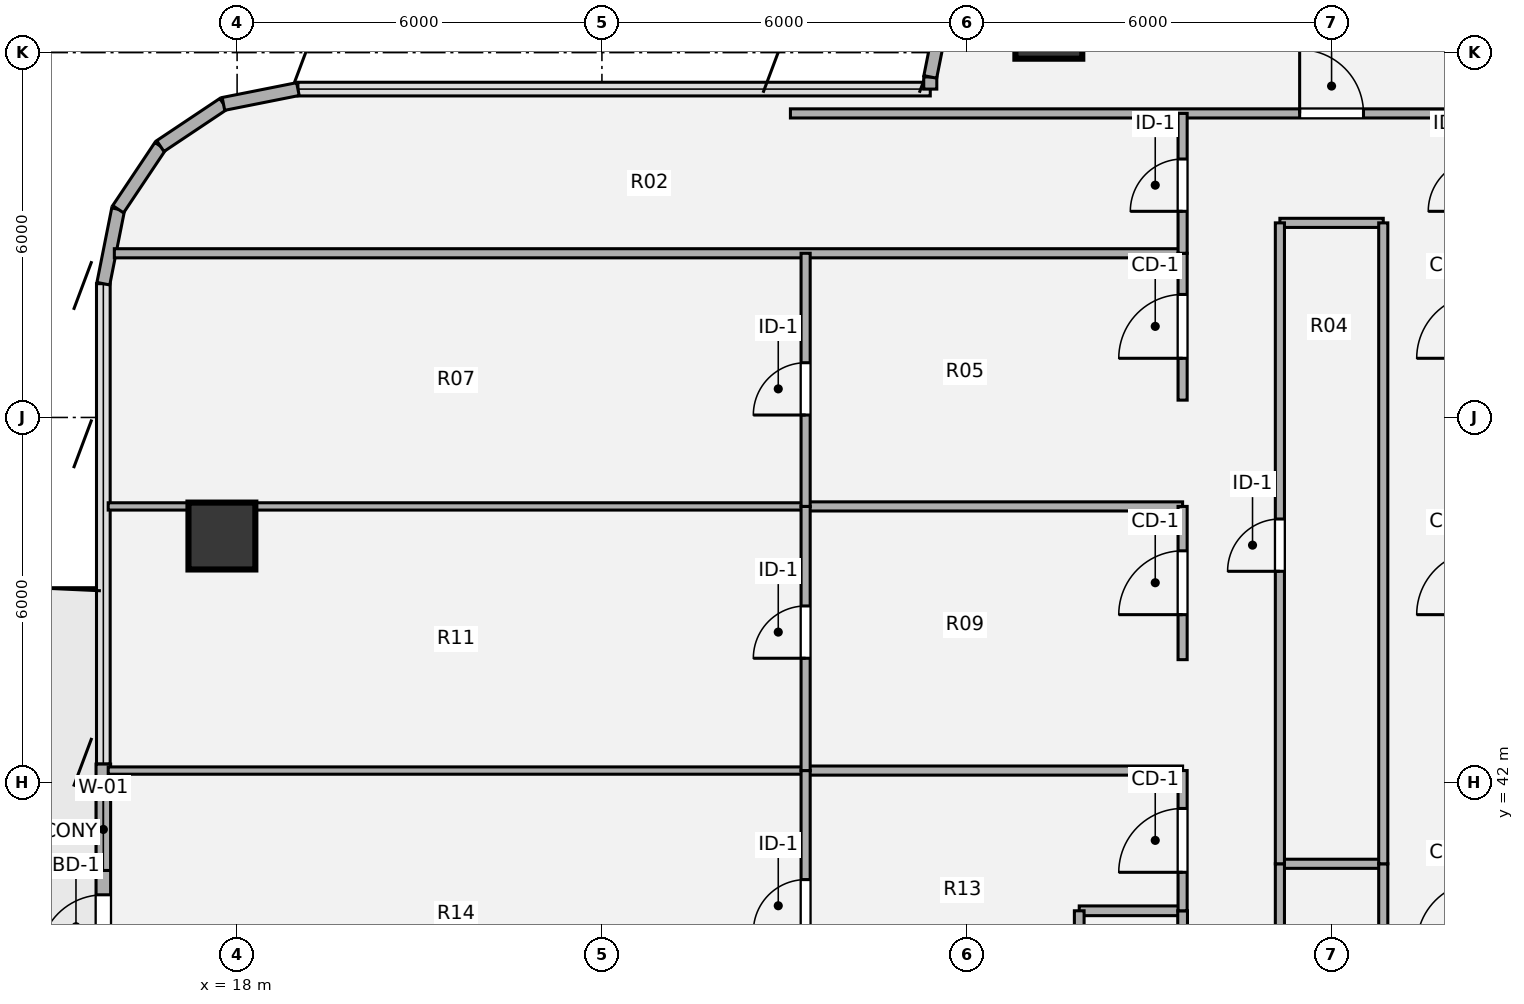
"""IFC4 building model, lengths in metres.
Left out: names, types, materials, properties, quantities, classifications, styles, units other than length and angle.
Written with IfcOpenShell. Run it as: python <this file> out.ifc"""

import sys

from ifc_helpers import new_model, si_unit, direction, frame, frame_2d, origin, origin_2d, place, context, subcontext, project, spatial, rectangle, hollow_circle, extrude, source, transform, mapped, element, fill, save


model = new_model("IFC4")
c1 = context("Model", 3, precision=1e-05, world=origin(), true_north=direction((0.0, 1.0)))
c2 = subcontext(c1, "Body", "Model", "MODEL_VIEW")
j1 = project(units=[si_unit("LENGTHUNIT", "METRE"), si_unit("PLANEANGLEUNIT", "RADIAN")], contexts=[c1])
p1 = place(None, origin())
s1 = spatial("IfcSite", under=j1, at=p1, CompositionType="ELEMENT")
p2 = place(p1, origin())
s2 = spatial("IfcBuilding", under=s1, at=p2, CompositionType="ELEMENT")
p3 = place(p2, frame((0.0, 0.0, 201.78)))
s3 = spatial("IfcBuildingStorey", under=s2, at=p3, CompositionType="ELEMENT", Elevation=201.78)
m1 = source(origin(), c2, "Body", "SweptSolid", [
    extrude(hollow_circle(Radius=0.55, WallThickness=0.04, at=origin_2d()), origin(), (0.0, 0.0, 1.0), 3.78),
])
for number, where, z_axis, x_axis in (
    (1, (17.75, 46.05, 0.0), (0.0, 0.0, 1.0), (1.0, 0.0, 0.0)),
    (2, (31.35, 54.45, 0.0), (0.0, 0.0, 1.0), (1.0, 0.0, 0.0)),
):
    element("IfcColumn", number, at=place(p3, frame(where, z_axis=z_axis, x_axis=x_axis)), inside=s3, PredefinedType="COLUMN", context=c2, shape_type="MappedRepresentation", body=[
        mapped(m1, transform((0.0, 0.0, 0.0), x_axis=(1.0, 0.0, 0.0), y_axis=(0.0, 1.0, 0.0), z_axis=(0.0, 0.0, 1.0), scale=1.0)),
    ])
p4 = place(p3, frame((15.8, 38.7, 0.0), z_axis=(0.0, 0.0, 1.0), x_axis=(0.0, 1.0, 0.0)))
e3 = element("IfcWall", 3, at=p4, inside=s3, PredefinedType="SOLIDWALL", context=c2, shape_type="SweptSolid", body=[
    extrude(rectangle(XDim=3.6, YDim=0.24, at=frame_2d((1.8, 0.0))), origin(), (0.0, 0.0, 1.0), 3.53),
])
p5 = place(p4, frame((0.4, 0.0, 0.0)))
e4 = element("IfcOpeningElement", 4, at=p5, cuts=e3, PredefinedType="OPENING", context=c2, shape_type="SweptSolid", body=[
    extrude(rectangle(XDim=1.05, YDim=2.15, at=origin_2d()), frame((0.525, 0.13, 1.075), z_axis=(0.0, -1.0, 0.0), x_axis=(1.0, 0.0, 0.0)), (0.0, 0.0, 1.0), 0.26),
])
p6 = place(p4, frame((1.85, 0.0, 0.85)))
e5 = element("IfcOpeningElement", 5, at=p6, cuts=e3, PredefinedType="OPENING", context=c2, shape_type="SweptSolid", body=[
    extrude(rectangle(XDim=1.35, YDim=1.35, at=origin_2d()), frame((0.675, 0.13, 0.675), z_axis=(0.0, -1.0, 0.0), x_axis=(1.0, 0.0, 0.0)), (0.0, 0.0, 1.0), 0.26),
])
for number, where, z_axis, x_axis in (
    (6, (15.8, 50.2, 0.0), (0.0, 0.0, 1.0), (0.195, 0.981, 0.0)),
    (7, (16.044, 51.425, 0.0), (0.0, 0.0, 1.0), (0.556, 0.831, 0.0)),
    (8, (16.737, 52.463, 0.0), (0.0, 0.0, 1.0), (0.831, 0.556, 0.0)),
    (9, (17.775, 53.156, 0.0), (0.0, 0.0, 1.0), (0.981, 0.195, 0.0)),
):
    element("IfcWall", number, at=place(p3, frame(where, z_axis=z_axis, x_axis=x_axis)), inside=s3, PredefinedType="SOLIDWALL", context=c2, shape_type="SweptSolid", body=[
        extrude(rectangle(XDim=1.249, YDim=0.215, at=frame_2d((0.624, 0.0))), origin(), (0.0, 0.0, 1.0), 3.53),
    ])
p7 = place(p3, frame((29.4, 53.4, 0.0), z_axis=(0.0, 0.0, 1.0), x_axis=(0.0, 1.0, 0.0)))
e10 = element("IfcWall", 10, at=p7, inside=s3, PredefinedType="SOLIDWALL", context=c2, shape_type="SweptSolid", body=[
    extrude(rectangle(XDim=0.2, YDim=0.215, at=frame_2d((0.1, 0.0))), origin(), (0.0, 0.0, 1.0), 3.53),
])
p8 = place(p3, frame((29.4, 53.6, 0.0), z_axis=(0.0, 0.0, 1.0), x_axis=(0.195127417394, 0.980777900945, 0.0)))
e11 = element("IfcWall", 11, at=p8, inside=s3, PredefinedType="SOLIDWALL", context=c2, shape_type="SweptSolid", body=[
    extrude(rectangle(XDim=1.092, YDim=0.215, at=frame_2d((0.546, 0.0))), origin(), (0.0, 0.0, 1.0), 3.53),
])
p9 = place(p3, frame((31.85, 39.887, 0.0), z_axis=(0.0, 0.0, 1.0), x_axis=(1.0, 0.0, 0.0)))
e12 = element("IfcWall", 12, at=p9, inside=s3, PredefinedType="PLUMBINGWALL", context=c2, shape_type="SweptSolid", body=[
    extrude(rectangle(XDim=1.7, YDim=0.16, at=frame_2d((0.85, 0.0))), origin(), (0.0, 0.0, 1.0), 3.259),
])
p10 = place(p3, frame((35.15, 40.66, 0.0), z_axis=(0.0, 0.0, 1.0), x_axis=(1.0, 0.0, 0.0)))
e13 = element("IfcWall", 13, at=p10, inside=s3, PredefinedType="PARTITIONING", context=c2, shape_type="SweptSolid", body=[
    extrude(rectangle(XDim=1.7, YDim=0.15, at=frame_2d((0.85, 0.0))), origin(), (0.0, 0.0, 1.0), 3.259),
])
p11 = place(p3, frame((15.88, 42.193, 0.0), z_axis=(0.0, 0.0, 1.0), x_axis=(1.0, 0.0, 0.0)))
e14 = element("IfcWall", 14, at=p11, inside=s3, PredefinedType="PARTITIONING", context=c2, shape_type="SweptSolid", body=[
    extrude(rectangle(XDim=11.47, YDim=0.12, at=frame_2d((5.735, 0.0))), origin(), (0.0, 0.0, 1.0), 2.982),
])
p12 = place(p3, frame((27.35, 42.193, 0.0), z_axis=(0.0, 0.0, 1.0), x_axis=(1.0, 0.0, 0.0)))
e15 = element("IfcWall", 15, at=p12, inside=s3, PredefinedType="PARTITIONING", context=c2, shape_type="SweptSolid", body=[
    extrude(rectangle(XDim=6.2, YDim=0.15, at=frame_2d((3.1, 0.0))), origin(), (0.0, 0.0, 1.0), 2.982),
])
p13 = place(p3, frame((15.88, 46.537, 0.0), z_axis=(0.0, 0.0, 1.0), x_axis=(1.0, 0.0, 0.0)))
e16 = element("IfcWall", 16, at=p13, inside=s3, PredefinedType="PARTITIONING", context=c2, shape_type="SweptSolid", body=[
    extrude(rectangle(XDim=11.47, YDim=0.12, at=frame_2d((5.735, 0.0))), origin(), (0.0, 0.0, 1.0), 3.5),
])
p14 = place(p3, frame((27.35, 46.537, 0.0), z_axis=(0.0, 0.0, 1.0), x_axis=(1.0, 0.0, 0.0)))
e17 = element("IfcWall", 17, at=p14, inside=s3, PredefinedType="PARTITIONING", context=c2, shape_type="SweptSolid", body=[
    extrude(rectangle(XDim=6.2, YDim=0.15, at=frame_2d((3.1, 0.0))), origin(), (0.0, 0.0, 1.0), 3.259),
])
p15 = place(p3, frame((15.981, 50.7, 0.0), z_axis=(0.0, 0.0, 1.0), x_axis=(1.0, 0.0, 0.0)))
e18 = element("IfcWall", 18, at=p15, inside=s3, PredefinedType="PARTITIONING", context=c2, shape_type="SweptSolid", body=[
    extrude(rectangle(XDim=17.569, YDim=0.15, at=frame_2d((8.785, 0.0))), origin(), (0.0, 0.0, 1.0), 3.308),
])
p16 = place(p3, frame((35.15, 51.2, 0.0), z_axis=(0.0, 0.0, 1.0), x_axis=(1.0, 0.0, 0.0)))
e19 = element("IfcWall", 19, at=p16, inside=s3, PredefinedType="PARTITIONING", context=c2, shape_type="SweptSolid", body=[
    extrude(rectangle(XDim=1.7, YDim=0.15, at=frame_2d((0.85, 0.0))), origin(), (0.0, 0.0, 1.0), 3.308),
])
p17 = place(p3, frame((27.1, 53.0, 0.0), z_axis=(0.0, 0.0, 1.0), x_axis=(1.0, 0.0, 0.0)))
e20 = element("IfcWall", 20, at=p17, inside=s3, PredefinedType="PARTITIONING", context=c2, shape_type="SweptSolid", body=[
    extrude(rectangle(XDim=17.8, YDim=0.15, at=frame_2d((8.9, 0.0))), origin(), (0.0, 0.0, 1.0), 3.308),
])
p18 = place(p17, frame((8.375, 0.0, 0.0)))
e21 = element("IfcOpeningElement", 21, at=p18, cuts=e20, PredefinedType="OPENING", context=c2, shape_type="SweptSolid", body=[
    extrude(rectangle(XDim=1.05, YDim=2.1, at=origin_2d()), frame((0.525, 0.085, 1.05), z_axis=(0.0, -1.0, 0.0), x_axis=(1.0, 0.0, 0.0)), (0.0, 0.0, 1.0), 0.17),
])
p19 = place(p3, frame((27.35, 37.487, 0.0), z_axis=(0.0, 0.0, 1.0), x_axis=(0.0, 1.0, 0.0)))
e22 = element("IfcWall", 22, at=p19, inside=s3, PredefinedType="PARTITIONING", context=c2, shape_type="SweptSolid", body=[
    extrude(rectangle(XDim=4.706, YDim=0.15, at=frame_2d((2.353, 0.0))), origin(), (0.0, 0.0, 1.0), 3.5),
])
p20 = place(p19, frame((2.053, 0.0, 0.0)))
e23 = element("IfcOpeningElement", 23, at=p20, cuts=e22, PredefinedType="OPENING", context=c2, shape_type="SweptSolid", body=[
    extrude(rectangle(XDim=0.86, YDim=2.1, at=origin_2d()), frame((0.43, 0.085, 1.05), z_axis=(0.0, -1.0, 0.0), x_axis=(1.0, 0.0, 0.0)), (0.0, 0.0, 1.0), 0.17),
])
p21 = place(p3, frame((27.35, 42.193, 0.0), z_axis=(0.0, 0.0, 1.0), x_axis=(0.0, 1.0, 0.0)))
e24 = element("IfcWall", 24, at=p21, inside=s3, PredefinedType="PARTITIONING", context=c2, shape_type="SweptSolid", body=[
    extrude(rectangle(XDim=4.344, YDim=0.15, at=frame_2d((2.172, 0.0))), origin(), (0.0, 0.0, 1.0), 3.5),
])
p22 = place(p21, frame((1.847, 0.0, 0.0)))
e25 = element("IfcOpeningElement", 25, at=p22, cuts=e24, PredefinedType="OPENING", context=c2, shape_type="SweptSolid", body=[
    extrude(rectangle(XDim=0.86, YDim=2.1, at=origin_2d()), frame((0.43, 0.085, 1.05), z_axis=(0.0, -1.0, 0.0), x_axis=(1.0, 0.0, 0.0)), (0.0, 0.0, 1.0), 0.17),
])
p23 = place(p3, frame((27.35, 46.537, 0.0), z_axis=(0.0, 0.0, 1.0), x_axis=(0.0, 1.0, 0.0)))
e26 = element("IfcWall", 26, at=p23, inside=s3, PredefinedType="PARTITIONING", context=c2, shape_type="SweptSolid", body=[
    extrude(rectangle(XDim=4.163, YDim=0.15, at=frame_2d((2.082, 0.0))), origin(), (0.0, 0.0, 1.0), 3.5),
])
p24 = place(p23, frame((1.503, 0.0, 0.0)))
e27 = element("IfcOpeningElement", 27, at=p24, cuts=e26, PredefinedType="OPENING", context=c2, shape_type="SweptSolid", body=[
    extrude(rectangle(XDim=0.86, YDim=2.1, at=origin_2d()), frame((0.43, 0.085, 1.05), z_axis=(0.0, -1.0, 0.0), x_axis=(1.0, 0.0, 0.0)), (0.0, 0.0, 1.0), 0.17),
])
p25 = place(p3, frame((31.85, 37.487, 0.0), z_axis=(0.0, 0.0, 1.0), x_axis=(0.0, 1.0, 0.0)))
e28 = element("IfcWall", 28, at=p25, inside=s3, PredefinedType="PLUMBINGWALL", context=c2, shape_type="SweptSolid", body=[
    extrude(rectangle(XDim=2.4, YDim=0.16, at=frame_2d((1.2, 0.0))), origin(), (0.0, 0.0, 1.0), 3.5),
])
p26 = place(p25, frame((0.42, 0.0, 0.0)))
e29 = element("IfcOpeningElement", 29, at=p26, cuts=e28, PredefinedType="OPENING", context=c2, shape_type="SweptSolid", body=[
    extrude(rectangle(XDim=0.86, YDim=2.1, at=origin_2d()), frame((0.43, 0.09, 1.05), z_axis=(0.0, -1.0, 0.0), x_axis=(1.0, 0.0, 0.0)), (0.0, 0.0, 1.0), 0.18),
])
p27 = place(p3, frame((33.55, 37.487, 0.0), z_axis=(0.0, 0.0, 1.0), x_axis=(0.0, 1.0, 0.0)))
e30 = element("IfcWall", 30, at=p27, inside=s3, PredefinedType="PLUMBINGWALL", context=c2, shape_type="SweptSolid", body=[
    extrude(rectangle(XDim=2.4, YDim=0.16, at=frame_2d((1.2, 0.0))), origin(), (0.0, 0.0, 1.0), 3.5),
])
p28 = place(p3, frame((33.55, 39.887, 0.0), z_axis=(0.0, 0.0, 1.0), x_axis=(0.0, 1.0, 0.0)))
e31 = element("IfcWall", 31, at=p28, inside=s3, PredefinedType="PARTITIONING", context=c2, shape_type="SweptSolid", body=[
    extrude(rectangle(XDim=2.306, YDim=0.15, at=frame_2d((1.153, 0.0))), origin(), (0.0, 0.0, 1.0), 3.5),
])
p29 = place(p28, frame((0.633, 0.0, 0.0)))
e32 = element("IfcOpeningElement", 32, at=p29, cuts=e31, PredefinedType="OPENING", context=c2, shape_type="SweptSolid", body=[
    extrude(rectangle(XDim=1.05, YDim=2.1, at=origin_2d()), frame((0.525, 0.085, 1.05), z_axis=(0.0, -1.0, 0.0), x_axis=(1.0, 0.0, 0.0)), (0.0, 0.0, 1.0), 0.17),
])
p30 = place(p3, frame((33.55, 44.017, 0.0), z_axis=(0.0, 0.0, 1.0), x_axis=(0.0, 1.0, 0.0)))
e33 = element("IfcWall", 33, at=p30, inside=s3, PredefinedType="PARTITIONING", context=c2, shape_type="SweptSolid", body=[
    extrude(rectangle(XDim=2.52, YDim=0.15, at=frame_2d((1.26, 0.0))), origin(), (0.0, 0.0, 1.0), 3.5),
])
p31 = place(p30, frame((0.74, 0.0, 0.0)))
e34 = element("IfcOpeningElement", 34, at=p31, cuts=e33, PredefinedType="OPENING", context=c2, shape_type="SweptSolid", body=[
    extrude(rectangle(XDim=1.05, YDim=2.1, at=origin_2d()), frame((0.525, 0.085, 1.05), z_axis=(0.0, -1.0, 0.0), x_axis=(1.0, 0.0, 0.0)), (0.0, 0.0, 1.0), 0.17),
])
p32 = place(p3, frame((33.55, 48.285, 0.0), z_axis=(0.0, 0.0, 1.0), x_axis=(0.0, 1.0, 0.0)))
e35 = element("IfcWall", 35, at=p32, inside=s3, PredefinedType="PARTITIONING", context=c2, shape_type="SweptSolid", body=[
    extrude(rectangle(XDim=2.415, YDim=0.15, at=frame_2d((1.208, 0.0))), origin(), (0.0, 0.0, 1.0), 3.5),
])
p33 = place(p32, frame((0.688, 0.0, 0.0)))
e36 = element("IfcOpeningElement", 36, at=p33, cuts=e35, PredefinedType="OPENING", context=c2, shape_type="SweptSolid", body=[
    extrude(rectangle(XDim=1.05, YDim=2.1, at=origin_2d()), frame((0.525, 0.085, 1.05), z_axis=(0.0, -1.0, 0.0), x_axis=(1.0, 0.0, 0.0)), (0.0, 0.0, 1.0), 0.17),
])
p34 = place(p3, frame((33.55, 50.7, 0.0), z_axis=(0.0, 0.0, 1.0), x_axis=(0.0, 1.0, 0.0)))
e37 = element("IfcWall", 37, at=p34, inside=s3, PredefinedType="PARTITIONING", context=c2, shape_type="SweptSolid", body=[
    extrude(rectangle(XDim=2.3, YDim=0.15, at=frame_2d((1.15, 0.0))), origin(), (0.0, 0.0, 1.0), 3.5),
])
p35 = place(p34, frame((0.69, 0.0, 0.0)))
e38 = element("IfcOpeningElement", 38, at=p35, cuts=e37, PredefinedType="OPENING", context=c2, shape_type="SweptSolid", body=[
    extrude(rectangle(XDim=0.86, YDim=2.1, at=origin_2d()), frame((0.43, 0.085, 1.05), z_axis=(0.0, -1.0, 0.0), x_axis=(1.0, 0.0, 0.0)), (0.0, 0.0, 1.0), 0.17),
])
p36 = place(p3, frame((35.15, 25.2, 0.0), z_axis=(0.0, 0.0, 1.0), x_axis=(0.0, 1.0, 0.0)))
e39 = element("IfcWall", 39, at=p36, inside=s3, PredefinedType="PARTITIONING", context=c2, shape_type="SweptSolid", body=[
    extrude(rectangle(XDim=15.46, YDim=0.15, at=frame_2d((7.73, 0.0))), origin(), (0.0, 0.0, 1.0), 3.5),
])
p37 = place(p3, frame((35.15, 40.66, 0.0), z_axis=(0.0, 0.0, 1.0), x_axis=(0.0, 1.0, 0.0)))
e40 = element("IfcWall", 40, at=p37, inside=s3, PredefinedType="PARTITIONING", context=c2, shape_type="SweptSolid", body=[
    extrude(rectangle(XDim=10.54, YDim=0.15, at=frame_2d((5.27, 0.0))), origin(), (0.0, 0.0, 1.0), 3.5),
])
p38 = place(p37, frame((4.81, 0.0, 0.0)))
e41 = element("IfcOpeningElement", 41, at=p38, cuts=e40, PredefinedType="OPENING", context=c2, shape_type="SweptSolid", body=[
    extrude(rectangle(XDim=0.86, YDim=2.1, at=origin_2d()), frame((0.43, 0.085, 1.05), z_axis=(0.0, -1.0, 0.0), x_axis=(1.0, 0.0, 0.0)), (0.0, 0.0, 1.0), 0.17),
])
p39 = place(p3, frame((36.85, 25.2, 0.0), z_axis=(0.0, 0.0, 1.0), x_axis=(0.0, 1.0, 0.0)))
e42 = element("IfcWall", 42, at=p39, inside=s3, PredefinedType="PARTITIONING", context=c2, shape_type="SweptSolid", body=[
    extrude(rectangle(XDim=15.46, YDim=0.15, at=frame_2d((7.73, 0.0))), origin(), (0.0, 0.0, 1.0), 3.5),
])
p40 = place(p39, frame((7.205, 0.0, 0.0)))
e43 = element("IfcOpeningElement", 43, at=p40, cuts=e42, PredefinedType="OPENING", context=c2, shape_type="SweptSolid", body=[
    extrude(rectangle(XDim=1.05, YDim=2.1, at=origin_2d()), frame((0.525, 0.085, 1.05), z_axis=(0.0, -1.0, 0.0), x_axis=(1.0, 0.0, 0.0)), (0.0, 0.0, 1.0), 0.17),
])
p41 = place(p3, frame((36.85, 40.66, 0.0), z_axis=(0.0, 0.0, 1.0), x_axis=(0.0, 1.0, 0.0)))
e44 = element("IfcWall", 44, at=p41, inside=s3, PredefinedType="PARTITIONING", context=c2, shape_type="SweptSolid", body=[
    extrude(rectangle(XDim=10.54, YDim=0.15, at=frame_2d((5.27, 0.0))), origin(), (0.0, 0.0, 1.0), 3.5),
])
m2 = source(origin(), c2, "Body", "SweptSolid", [
    extrude(rectangle(XDim=1.05, YDim=2.15, at=origin_2d()), frame((0.525, 0.025, 1.075), z_axis=(0.0, -1.0, 0.0), x_axis=(1.0, 0.0, 0.0)), (0.0, 0.0, 1.0), 0.05),
])
p42 = place(p5, origin())
e45 = element("IfcDoor", 45, at=p42, inside=s3, OperationType="SINGLE_SWING_LEFT", PredefinedType="DOOR", context=c2, shape_type="MappedRepresentation", body=[
    mapped(m2, transform((0.0, 0.0, 0.0), x_axis=(1.0, 0.0, 0.0), y_axis=(0.0, 1.0, 0.0), z_axis=(0.0, 0.0, 1.0), scale=1.0)),
])
fill(e4, e45)
m3 = source(origin(), c2, "Body", "SweptSolid", [
    extrude(rectangle(XDim=1.35, YDim=1.35, at=origin_2d()), frame((0.675, 0.03, 0.675), z_axis=(0.0, -1.0, 0.0), x_axis=(1.0, 0.0, 0.0)), (0.0, 0.0, 1.0), 0.06),
])
p43 = place(p6, origin())
e46 = element("IfcWindow", 46, at=p43, inside=s3, PartitioningType="SINGLE_PANEL", PredefinedType="WINDOW", context=c2, shape_type="MappedRepresentation", body=[
    mapped(m3, transform((0.0, 0.0, 0.0), x_axis=(1.0, 0.0, 0.0), y_axis=(0.0, 1.0, 0.0), z_axis=(0.0, 0.0, 1.0), scale=1.0)),
])
fill(e5, e46)
m4 = source(origin(), c2, "Body", "SweptSolid", [
    extrude(rectangle(XDim=1.05, YDim=2.1, at=origin_2d()), frame((0.525, 0.025, 1.05), z_axis=(0.0, -1.0, 0.0), x_axis=(1.0, 0.0, 0.0)), (0.0, 0.0, 1.0), 0.05),
])
p44 = place(p18, origin())
e47 = element("IfcDoor", 47, at=p44, inside=s3, OperationType="SINGLE_SWING_LEFT", PredefinedType="DOOR", context=c2, shape_type="MappedRepresentation", body=[
    mapped(m4, transform((0.0, 0.0, 0.0), x_axis=(1.0, 0.0, 0.0), y_axis=(0.0, 1.0, 0.0), z_axis=(0.0, 0.0, 1.0), scale=1.0)),
])
fill(e21, e47)
m5 = source(origin(), c2, "Body", "SweptSolid", [
    extrude(rectangle(XDim=0.86, YDim=2.1, at=origin_2d()), frame((0.43, 0.025, 1.05), z_axis=(0.0, -1.0, 0.0), x_axis=(1.0, 0.0, 0.0)), (0.0, 0.0, 1.0), 0.05),
])
p45 = place(p20, origin())
e48 = element("IfcDoor", 48, at=p45, inside=s3, OperationType="SINGLE_SWING_LEFT", PredefinedType="DOOR", context=c2, shape_type="MappedRepresentation", body=[
    mapped(m5, transform((0.0, 0.0, 0.0), x_axis=(1.0, 0.0, 0.0), y_axis=(0.0, 1.0, 0.0), z_axis=(0.0, 0.0, 1.0), scale=1.0)),
])
fill(e23, e48)
p46 = place(p22, origin())
e49 = element("IfcDoor", 49, at=p46, inside=s3, OperationType="SINGLE_SWING_LEFT", PredefinedType="DOOR", context=c2, shape_type="MappedRepresentation", body=[
    mapped(m5, transform((0.0, 0.0, 0.0), x_axis=(1.0, 0.0, 0.0), y_axis=(0.0, 1.0, 0.0), z_axis=(0.0, 0.0, 1.0), scale=1.0)),
])
fill(e25, e49)
p47 = place(p24, origin())
e50 = element("IfcDoor", 50, at=p47, inside=s3, OperationType="SINGLE_SWING_LEFT", PredefinedType="DOOR", context=c2, shape_type="MappedRepresentation", body=[
    mapped(m5, transform((0.0, 0.0, 0.0), x_axis=(1.0, 0.0, 0.0), y_axis=(0.0, 1.0, 0.0), z_axis=(0.0, 0.0, 1.0), scale=1.0)),
])
fill(e27, e50)
m6 = source(origin(), c2, "Body", "SweptSolid", [
    extrude(rectangle(XDim=1.05, YDim=2.1, at=origin_2d()), frame((0.525, 0.025, 1.05), z_axis=(0.0, -1.0, 0.0), x_axis=(1.0, 0.0, 0.0)), (0.0, 0.0, 1.0), 0.05),
])
p48 = place(p29, origin())
e51 = element("IfcDoor", 51, at=p48, inside=s3, OperationType="SINGLE_SWING_LEFT", PredefinedType="DOOR", context=c2, shape_type="MappedRepresentation", body=[
    mapped(m6, transform((0.0, 0.0, 0.0), x_axis=(1.0, 0.0, 0.0), y_axis=(0.0, 1.0, 0.0), z_axis=(0.0, 0.0, 1.0), scale=1.0)),
])
fill(e32, e51)
p49 = place(p31, origin())
e52 = element("IfcDoor", 52, at=p49, inside=s3, OperationType="SINGLE_SWING_LEFT", PredefinedType="DOOR", context=c2, shape_type="MappedRepresentation", body=[
    mapped(m6, transform((0.0, 0.0, 0.0), x_axis=(1.0, 0.0, 0.0), y_axis=(0.0, 1.0, 0.0), z_axis=(0.0, 0.0, 1.0), scale=1.0)),
])
fill(e34, e52)
p50 = place(p33, origin())
e53 = element("IfcDoor", 53, at=p50, inside=s3, OperationType="SINGLE_SWING_LEFT", PredefinedType="DOOR", context=c2, shape_type="MappedRepresentation", body=[
    mapped(m6, transform((0.0, 0.0, 0.0), x_axis=(1.0, 0.0, 0.0), y_axis=(0.0, 1.0, 0.0), z_axis=(0.0, 0.0, 1.0), scale=1.0)),
])
fill(e36, e53)
p51 = place(p35, origin())
e54 = element("IfcDoor", 54, at=p51, inside=s3, OperationType="SINGLE_SWING_LEFT", PredefinedType="DOOR", context=c2, shape_type="MappedRepresentation", body=[
    mapped(m5, transform((0.0, 0.0, 0.0), x_axis=(1.0, 0.0, 0.0), y_axis=(0.0, 1.0, 0.0), z_axis=(0.0, 0.0, 1.0), scale=1.0)),
])
fill(e38, e54)
p52 = place(p38, origin())
e55 = element("IfcDoor", 55, at=p52, inside=s3, OperationType="SINGLE_SWING_LEFT", PredefinedType="DOOR", context=c2, shape_type="MappedRepresentation", body=[
    mapped(m5, transform((0.0, 0.0, 0.0), x_axis=(1.0, 0.0, 0.0), y_axis=(0.0, 1.0, 0.0), z_axis=(0.0, 0.0, 1.0), scale=1.0)),
])
fill(e41, e55)
save(model, sys.argv[1])
